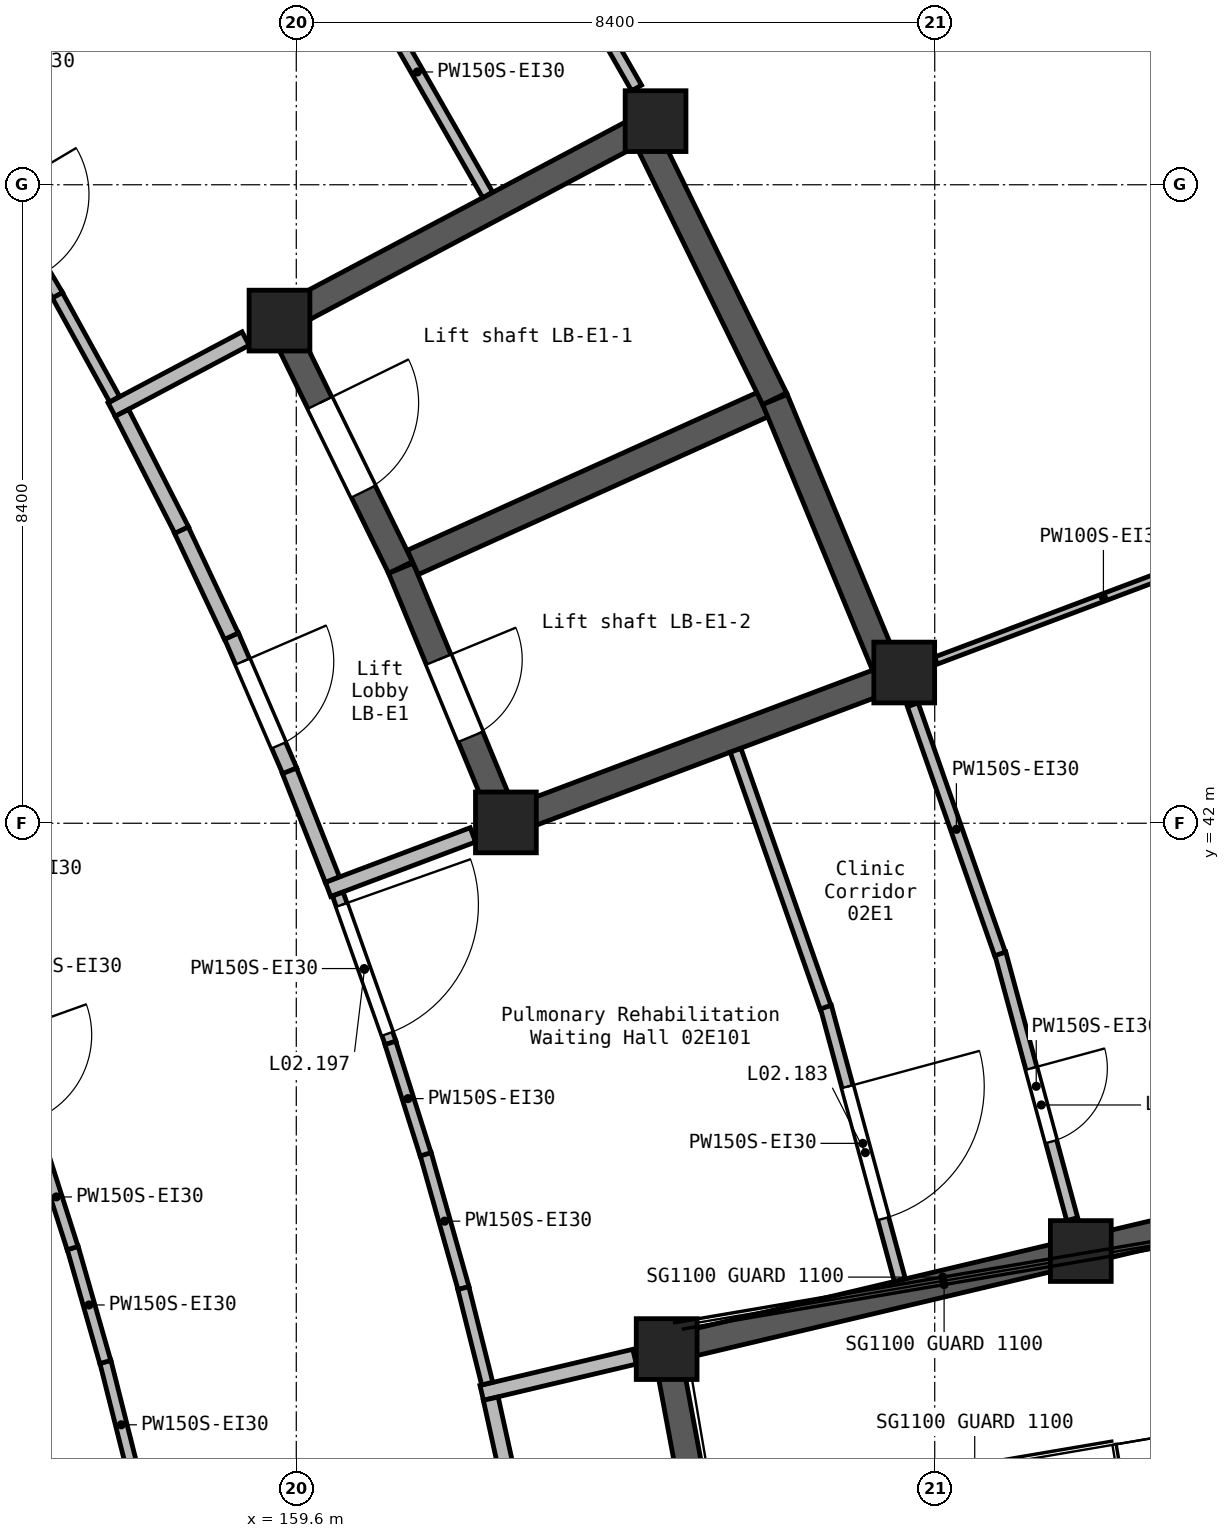
"""IFC4 building model, lengths in metres.
Left out: names, types, materials, properties, quantities, classifications, styles, units other than length and angle.
Written with IfcOpenShell. Run it as: python <this file> out.ifc"""

import sys

from ifc_helpers import new_model, si_unit, direction, frame, frame_2d, origin, origin_2d, place, context, subcontext, project, spatial, rectangle, extrude, element, fill, save


model = new_model("IFC4")
c1 = context("Model", 3, precision=1e-05, world=origin(), true_north=direction((0.0, 1.0)))
c2 = subcontext(c1, "Body", "Model", "MODEL_VIEW")
j1 = project(units=[si_unit("LENGTHUNIT", "METRE"), si_unit("PLANEANGLEUNIT", "RADIAN")], contexts=[c1])
p1 = place(None, origin())
s1 = spatial("IfcSite", under=j1, at=p1, CompositionType="ELEMENT")
p2 = place(p1, origin())
s2 = spatial("IfcBuilding", under=s1, at=p2, CompositionType="ELEMENT")
p3 = place(p2, frame((0.0, 0.0, 12.6)))
s3 = spatial("IfcBuildingStorey", under=s2, at=p3, CompositionType="ELEMENT", Elevation=12.6)
for number, where, z_axis, x_axis in (
    (1, (159.379, 48.613, 0.0), (0.0, 0.0, 1.0), (1.0, 0.0, 0.0)),
    (2, (162.358, 42.011, 0.0), (0.0, 0.0, 1.0), (1.0, 0.0, 0.0)),
    (3, (164.327, 51.237, 0.0), (0.0, 0.0, 1.0), (1.0, 0.0, 0.0)),
    (4, (164.473, 35.082, 0.0), (0.0, 0.0, 1.0), (1.0, 0.0, 0.0)),
    (5, (167.599, 43.983, 0.0), (0.0, 0.0, 1.0), (1.0, 0.0, 0.0)),
    (6, (169.922, 36.372, 0.0), (0.0, 0.0, 1.0), (1.0, 0.0, 0.0)),
):
    element("IfcColumn", number, at=place(p3, frame(where, z_axis=z_axis, x_axis=x_axis)), inside=s3, PredefinedType="COLUMN", context=c2, shape_type="SweptSolid", body=[
        extrude(rectangle(XDim=0.8, YDim=0.8, at=origin_2d()), origin(), (0.0, 0.0, 1.0), 4.2),
    ])
p4 = place(p3, frame((159.224, 48.531, 0.0), z_axis=(0.0, 0.0, 1.0), x_axis=(0.883393138637, 0.468632652094, 0.0)))
e7 = element("IfcWall", 7, at=p4, inside=s3, PredefinedType="SHEAR", context=c2, shape_type="SweptSolid", body=[
    extrude(rectangle(XDim=5.751, YDim=0.35, at=frame_2d((2.875, 0.0))), origin(), (0.0, 0.0, 1.0), 4.2),
])
p5 = place(p3, frame((159.456, 48.456, 0.0), z_axis=(0.0, 0.0, 1.0), x_axis=(0.440221126053, -0.89788939195, 0.0)))
e8 = element("IfcWall", 8, at=p5, inside=s3, PredefinedType="SHEAR", context=c2, shape_type="SweptSolid", body=[
    extrude(rectangle(XDim=3.442, YDim=0.35, at=frame_2d((1.721, 0.0))), origin(), (0.0, 0.0, 1.0), 4.2),
])
p6 = place(p5, frame((1.031, 0.0, 0.0)))
e9 = element("IfcOpeningElement", 9, at=p6, cuts=e8, PredefinedType="OPENING", context=c2, shape_type="SweptSolid", body=[
    extrude(rectangle(XDim=1.3, YDim=2.1, at=frame_2d((0.65, 1.05))), frame((0.0, 0.185, 0.0), z_axis=(0.0, -1.0, 0.0), x_axis=(1.0, 0.0, 0.0)), (0.0, 0.0, 1.0), 0.37),
])
p7 = place(p3, frame((160.976, 45.355, 0.0), z_axis=(0.0, 0.0, 1.0), x_axis=(0.381990591944, -0.924166212143, 0.0)))
e10 = element("IfcWall", 10, at=p7, inside=s3, PredefinedType="SHEAR", context=c2, shape_type="SweptSolid", body=[
    extrude(rectangle(XDim=3.443, YDim=0.35, at=frame_2d((1.721, 0.0))), origin(), (0.0, 0.0, 1.0), 4.2),
])
p8 = place(p7, frame((1.3, 0.0, 0.0)))
e11 = element("IfcOpeningElement", 11, at=p8, cuts=e10, PredefinedType="OPENING", context=c2, shape_type="SweptSolid", body=[
    extrude(rectangle(XDim=1.1, YDim=2.1, at=frame_2d((0.55, 1.05))), frame((0.0, 0.185, 0.0), z_axis=(0.0, -1.0, 0.0), x_axis=(1.0, 0.0, 0.0)), (0.0, 0.0, 1.0), 0.37),
])
p9 = place(p3, frame((161.134, 45.432, 0.0), z_axis=(0.0, 0.0, 1.0), x_axis=(0.911564728385, 0.411156595427, 0.0)))
e12 = element("IfcWall", 12, at=p9, inside=s3, PredefinedType="SHEAR", context=c2, shape_type="SweptSolid", body=[
    extrude(rectangle(XDim=5.05, YDim=0.35, at=frame_2d((2.525, 0.0))), origin(), (0.0, 0.0, 1.0), 4.2),
])
p10 = place(p3, frame((162.194, 41.949, 0.0), z_axis=(0.0, 0.0, 1.0), x_axis=(0.935920223106, 0.352212061095, 0.0)))
e13 = element("IfcWall", 13, at=p10, inside=s3, PredefinedType="SHEAR", context=c2, shape_type="SweptSolid", body=[
    extrude(rectangle(XDim=5.75, YDim=0.35, at=frame_2d((2.875, 0.0))), origin(), (0.0, 0.0, 1.0), 4.2),
])
p11 = place(p3, frame((164.303, 35.042, 0.0), z_axis=(0.0, 0.0, 1.0), x_axis=(0.973093454504, 0.230410782737, 0.0)))
e14 = element("IfcWall", 14, at=p11, inside=s3, PredefinedType="SHEAR", context=c2, shape_type="SweptSolid", body=[
    extrude(rectangle(XDim=7.55, YDim=0.35, at=frame_2d((3.775, 0.0))), origin(), (0.0, 0.0, 1.0), 4.2),
])
p12 = place(p3, frame((165.469, 29.746, 0.0), z_axis=(0.0, 0.0, 1.0), x_axis=(-0.183471964923, 0.98302494276, 0.0)))
e15 = element("IfcWall", 15, at=p12, inside=s3, PredefinedType="SHEAR", context=c2, shape_type="SweptSolid", body=[
    extrude(rectangle(XDim=5.253, YDim=0.35, at=frame_2d((2.627, 0.0))), origin(), (0.0, 0.0, 1.0), 4.2),
])
p13 = place(p3, frame((165.894, 47.585, 0.0), z_axis=(0.0, 0.0, 1.0), x_axis=(-0.43992897418, 0.898032570499, 0.0)))
e16 = element("IfcWall", 16, at=p13, inside=s3, PredefinedType="SHEAR", context=c2, shape_type="SweptSolid", body=[
    extrude(rectangle(XDim=3.788, YDim=0.35, at=frame_2d((1.894, 0.0))), origin(), (0.0, 0.0, 1.0), 4.2),
])
p14 = place(p3, frame((167.345, 44.075, 0.0), z_axis=(0.0, 0.0, 1.0), x_axis=(-0.382046231428, 0.924143212415, 0.0)))
e17 = element("IfcWall", 17, at=p14, inside=s3, PredefinedType="SHEAR", context=c2, shape_type="SweptSolid", body=[
    extrude(rectangle(XDim=3.788, YDim=0.35, at=frame_2d((1.894, 0.0))), origin(), (0.0, 0.0, 1.0), 4.2),
])
p15 = place(p3, frame((162.04, 34.506, 0.0), z_axis=(0.0, 0.0, 1.0), x_axis=(0.973117236519, 0.230310321066, 0.0)))
e18 = element("IfcWall", 18, at=p15, inside=s3, PredefinedType="SOLIDWALL", context=c2, shape_type="SweptSolid", body=[
    extrude(rectangle(XDim=2.066, YDim=0.2, at=frame_2d((1.033, 0.0))), origin(), (0.0, 0.0, 1.0), 3.85),
])
p16 = place(p3, frame((160.018, 41.13, 0.0), z_axis=(0.0, 0.0, 1.0), x_axis=(0.935835444075, 0.352437259115, 0.0)))
e19 = element("IfcWall", 19, at=p16, inside=s3, PredefinedType="SOLIDWALL", context=c2, shape_type="SweptSolid", body=[
    extrude(rectangle(XDim=2.036, YDim=0.2, at=frame_2d((1.018, 0.0))), origin(), (0.0, 0.0, 1.0), 3.85),
])
p17 = place(p3, frame((157.171, 47.442, 0.0), z_axis=(0.0, 0.0, 1.0), x_axis=(0.883475149074, 0.468478026133, 0.0)))
e20 = element("IfcWall", 20, at=p17, inside=s3, PredefinedType="SOLIDWALL", context=c2, shape_type="SweptSolid", body=[
    extrude(rectangle(XDim=1.995, YDim=0.2, at=frame_2d((0.998, 0.0))), origin(), (0.0, 0.0, 1.0), 3.85),
])
p18 = place(p3, frame((158.747, 44.465, 0.0), z_axis=(0.0, 0.0, 1.0), x_axis=(0.396322487651, -0.918111368943, 0.0)))
e21 = element("IfcWall", 21, at=p18, inside=s3, PredefinedType="SOLIDWALL", context=c2, shape_type="SweptSolid", body=[
    extrude(rectangle(XDim=1.936, YDim=0.2, at=frame_2d((0.968, 0.0))), origin(), (0.0, 0.0, 1.0), 3.85),
])
p19 = place(p18, frame((0.368, 0.0, 0.0)))
e22 = element("IfcOpeningElement", 22, at=p19, cuts=e21, PredefinedType="OPENING", context=c2, shape_type="SweptSolid", body=[
    extrude(rectangle(XDim=1.2, YDim=2.1, at=frame_2d((0.6, 1.05))), frame((0.0, 0.11, 0.0), z_axis=(0.0, -1.0, 0.0), x_axis=(1.0, 0.0, 0.0)), (0.0, 0.0, 1.0), 0.22),
])
p20 = place(p3, frame((157.305, 47.399, 0.0), z_axis=(0.0, 0.0, 1.0), x_axis=(0.454575201636, -0.890708361955, 0.0)))
e23 = element("IfcWall", 23, at=p20, inside=s3, PredefinedType="SOLIDWALL", context=c2, shape_type="SweptSolid", body=[
    extrude(rectangle(XDim=1.734, YDim=0.2, at=frame_2d((0.867, 0.0))), origin(), (0.0, 0.0, 1.0), 3.85),
])
p21 = place(p3, frame((162.159, 34.43, 0.0), z_axis=(0.0, 0.0, 1.0), x_axis=(0.215079958229, -0.976596442533, 0.0)))
e24 = element("IfcWall", 24, at=p21, inside=s3, PredefinedType="SOLIDWALL", context=c2, shape_type="SweptSolid", body=[
    extrude(rectangle(XDim=1.537, YDim=0.2, at=frame_2d((0.769, 0.0))), origin(), (0.0, 0.0, 1.0), 3.85),
])
p22 = place(p3, frame((158.089, 45.855, 0.0), z_axis=(0.0, 0.0, 1.0), x_axis=(0.42579703633, -0.904818702201, 0.0)))
e25 = element("IfcWall", 25, at=p22, inside=s3, PredefinedType="SOLIDWALL", context=c2, shape_type="SweptSolid", body=[
    extrude(rectangle(XDim=1.541, YDim=0.2, at=frame_2d((0.771, 0.0))), origin(), (0.0, 0.0, 1.0), 3.85),
])
p23 = place(p3, frame((159.51, 42.689, 0.0), z_axis=(0.0, 0.0, 1.0), x_axis=(0.367195475631, -0.930143796773, 0.0)))
e26 = element("IfcWall", 26, at=p23, inside=s3, PredefinedType="SOLIDWALL", context=c2, shape_type="SweptSolid", body=[
    extrude(rectangle(XDim=1.537, YDim=0.2, at=frame_2d((0.768, 0.0))), origin(), (0.0, 0.0, 1.0), 3.85),
])
p24 = place(p3, frame((162.313, 54.758, 0.0), z_axis=(0.0, 0.0, 1.0), x_axis=(0.496582798362, -0.867989357291, 0.0)))
e27 = element("IfcWall", 27, at=p24, inside=s3, PredefinedType="PARTITIONING", context=c2, shape_type="SweptSolid", body=[
    extrude(rectangle(XDim=3.553, YDim=0.15, at=frame_2d((1.777, 0.0))), origin(), (0.0, 0.0, 1.0), 3.85),
])
p25 = place(p24, frame((1.566, 0.0, 0.0)))
e28 = element("IfcOpeningElement", 28, at=p25, cuts=e27, PredefinedType="OPENING", context=c2, shape_type="SweptSolid", body=[
    extrude(rectangle(XDim=1.0, YDim=2.1, at=frame_2d((0.5, 1.05))), frame((0.0, 0.085, 0.0), z_axis=(0.0, -1.0, 0.0), x_axis=(1.0, 0.0, 0.0)), (0.0, 0.0, 1.0), 0.17),
])
p26 = place(p3, frame((168.862, 40.287, 0.0), z_axis=(0.0, 0.0, 1.0), x_axis=(0.261268938462, -0.965266047157, 0.0)))
e29 = element("IfcWall", 29, at=p26, inside=s3, PredefinedType="PARTITIONING", context=c2, shape_type="SweptSolid", body=[
    extrude(rectangle(XDim=3.622, YDim=0.15, at=frame_2d((1.811, 0.0))), origin(), (0.0, 0.0, 1.0), 3.85),
])
p27 = place(p26, frame((1.566, 0.0, 0.0)))
e30 = element("IfcOpeningElement", 30, at=p27, cuts=e29, PredefinedType="OPENING", context=c2, shape_type="SweptSolid", body=[
    extrude(rectangle(XDim=1.0, YDim=2.1, at=frame_2d((0.5, 1.05))), frame((0.0, 0.085, 0.0), z_axis=(0.0, -1.0, 0.0), x_axis=(1.0, 0.0, 0.0)), (0.0, 0.0, 1.0), 0.17),
])
p28 = place(p3, frame((167.711, 43.559, 0.0), z_axis=(0.0, 0.0, 1.0), x_axis=(0.330491338893, -0.9438090246, 0.0)))
e31 = element("IfcWall", 31, at=p28, inside=s3, PredefinedType="PARTITIONING", context=c2, shape_type="SweptSolid", body=[
    extrude(rectangle(XDim=3.473, YDim=0.15, at=frame_2d((1.736, 0.0))), origin(), (0.0, 0.0, 1.0), 3.85),
])
p29 = place(p3, frame((166.567, 39.586, 0.0), z_axis=(0.0, 0.0, 1.0), x_axis=(0.261225938755, -0.965277684877, 0.0)))
e32 = element("IfcWall", 32, at=p29, inside=s3, PredefinedType="PARTITIONING", context=c2, shape_type="SweptSolid", body=[
    extrude(rectangle(XDim=3.725, YDim=0.15, at=frame_2d((1.863, 0.0))), origin(), (0.0, 0.0, 1.0), 3.85),
])
p30 = place(p29, frame((1.089, 0.0, 0.0)))
e33 = element("IfcOpeningElement", 33, at=p30, cuts=e32, PredefinedType="OPENING", context=c2, shape_type="SweptSolid", body=[
    extrude(rectangle(XDim=1.8, YDim=2.1, at=frame_2d((0.9, 1.05))), frame((0.0, 0.085, 0.0), z_axis=(0.0, -1.0, 0.0), x_axis=(1.0, 0.0, 0.0)), (0.0, 0.0, 1.0), 0.17),
])
p31 = place(p3, frame((160.269, 53.501, 0.0), z_axis=(0.0, 0.0, 1.0), x_axis=(0.496371795626, -0.8681100394, 0.0)))
e34 = element("IfcWall", 34, at=p31, inside=s3, PredefinedType="PARTITIONING", context=c2, shape_type="SweptSolid", body=[
    extrude(rectangle(XDim=3.726, YDim=0.15, at=frame_2d((1.863, 0.0))), origin(), (0.0, 0.0, 1.0), 3.85),
])
p32 = place(p3, frame((165.38, 42.96, 0.0), z_axis=(0.0, 0.0, 1.0), x_axis=(0.330508329073, -0.943803075018, 0.0)))
e35 = element("IfcWall", 35, at=p32, inside=s3, PredefinedType="PARTITIONING", context=c2, shape_type="SweptSolid", body=[
    extrude(rectangle(XDim=3.581, YDim=0.15, at=frame_2d((1.791, 0.0))), origin(), (0.0, 0.0, 1.0), 3.85),
])
p33 = place(p3, frame((160.146, 41.068, 0.0), z_axis=(0.0, 0.0, 1.0), x_axis=(0.334170983673, -0.942512468708, 0.0)))
e36 = element("IfcWall", 36, at=p33, inside=s3, PredefinedType="PARTITIONING", context=c2, shape_type="SweptSolid", body=[
    extrude(rectangle(XDim=2.079, YDim=0.15, at=frame_2d((1.04, 0.0))), origin(), (0.0, 0.0, 1.0), 3.85),
])
p34 = place(p33, frame((0.151, 0.0, 0.0)))
e37 = element("IfcOpeningElement", 37, at=p34, cuts=e36, PredefinedType="OPENING", context=c2, shape_type="SweptSolid", body=[
    extrude(rectangle(XDim=1.8, YDim=2.1, at=frame_2d((0.9, 1.05))), frame((0.0, 0.085, 0.0), z_axis=(0.0, -1.0, 0.0), x_axis=(1.0, 0.0, 0.0)), (0.0, 0.0, 1.0), 0.17),
])
p35 = place(p3, frame((155.498, 50.566, 0.0), z_axis=(0.0, 0.0, 1.0), x_axis=(0.510320389621, -0.859984360287, 0.0)))
e38 = element("IfcWall", 38, at=p35, inside=s3, PredefinedType="PARTITIONING", context=c2, shape_type="SweptSolid", body=[
    extrude(rectangle(XDim=1.886, YDim=0.15, at=frame_2d((0.943, 0.0))), origin(), (0.0, 0.0, 1.0), 3.85),
])
p36 = place(p35, frame((0.343, 0.0, 0.0)))
e39 = element("IfcOpeningElement", 39, at=p36, cuts=e38, PredefinedType="OPENING", context=c2, shape_type="SweptSolid", body=[
    extrude(rectangle(XDim=1.2, YDim=2.1, at=frame_2d((0.6, 1.05))), frame((0.0, 0.085, 0.0), z_axis=(0.0, -1.0, 0.0), x_axis=(1.0, 0.0, 0.0)), (0.0, 0.0, 1.0), 0.17),
])
p37 = place(p3, frame((156.457, 48.945, 0.0), z_axis=(0.0, 0.0, 1.0), x_axis=(0.482411223267, -0.875944867937, 0.0)))
e40 = element("IfcWall", 40, at=p37, inside=s3, PredefinedType="PARTITIONING", context=c2, shape_type="SweptSolid", body=[
    extrude(rectangle(XDim=1.56, YDim=0.15, at=frame_2d((0.78, 0.0))), origin(), (0.0, 0.0, 1.0), 3.85),
])
p38 = place(p3, frame((161.302, 37.647, 0.0), z_axis=(0.0, 0.0, 1.0), x_axis=(0.271536076628, -0.962428261789, 0.0)))
e41 = element("IfcWall", 41, at=p38, inside=s3, PredefinedType="PARTITIONING", context=c2, shape_type="SweptSolid", body=[
    extrude(rectangle(XDim=1.833, YDim=0.15, at=frame_2d((0.917, 0.0))), origin(), (0.0, 0.0, 1.0), 3.85),
])
p39 = place(p3, frame((160.838, 39.11, 0.0), z_axis=(0.0, 0.0, 1.0), x_axis=(0.301321411033, -0.953522630698, 0.0)))
e42 = element("IfcWall", 42, at=p39, inside=s3, PredefinedType="PARTITIONING", context=c2, shape_type="SweptSolid", body=[
    extrude(rectangle(XDim=1.537, YDim=0.15, at=frame_2d((0.769, 0.0))), origin(), (0.0, 0.0, 1.0), 3.85),
])
p40 = place(p3, frame((157.089, 34.915, 0.0), z_axis=(0.0, 0.0, 1.0), x_axis=(0.243846269547, -0.969813898038, 0.0)))
e43 = element("IfcWall", 43, at=p40, inside=s3, PredefinedType="PARTITIONING", context=c2, shape_type="SweptSolid", body=[
    extrude(rectangle(XDim=1.709, YDim=0.15, at=frame_2d((0.854, 0.0))), origin(), (0.0, 0.0, 1.0), 3.85),
])
p41 = place(p3, frame((156.658, 36.413, 0.0), z_axis=(0.0, 0.0, 1.0), x_axis=(0.27445261009, -0.961600626463, 0.0)))
e44 = element("IfcWall", 44, at=p41, inside=s3, PredefinedType="PARTITIONING", context=c2, shape_type="SweptSolid", body=[
    extrude(rectangle(XDim=1.561, YDim=0.15, at=frame_2d((0.781, 0.0))), origin(), (0.0, 0.0, 1.0), 3.85),
])
p42 = place(p3, frame((156.227, 37.757, 0.0), z_axis=(0.0, 0.0, 1.0), x_axis=(0.304180257637, -0.95261449226, 0.0)))
e45 = element("IfcWall", 45, at=p42, inside=s3, PredefinedType="PARTITIONING", context=c2, shape_type="SweptSolid", body=[
    extrude(rectangle(XDim=1.413, YDim=0.15, at=frame_2d((0.707, 0.0))), origin(), (0.0, 0.0, 1.0), 3.85),
])
p43 = place(p3, frame((161.798, 35.884, 0.0), z_axis=(0.0, 0.0, 1.0), x_axis=(0.243023571224, -0.970020383203, 0.0)))
e46 = element("IfcWall", 46, at=p43, inside=s3, PredefinedType="PARTITIONING", context=c2, shape_type="SweptSolid", body=[
    extrude(rectangle(XDim=1.295, YDim=0.15, at=frame_2d((0.647, 0.0))), origin(), (0.0, 0.0, 1.0), 3.85),
])
p44 = place(p3, frame((168.016, 44.14, 0.0), z_axis=(0.0, 0.0, 1.0), x_axis=(0.935850976525, 0.352396012659, 0.0)))
e47 = element("IfcWall", 47, at=p44, inside=s3, PredefinedType="PARTITIONING", context=c2, shape_type="SweptSolid", body=[
    extrude(rectangle(XDim=4.708, YDim=0.1, at=frame_2d((2.354, 0.0))), origin(), (0.0, 0.0, 1.0), 3.85),
])
p45 = place(p30, origin())
e48 = element("IfcDoor", 48, at=p45, inside=s3, OperationType="DOUBLE_DOOR_SINGLE_SWING", PredefinedType="DOOR", context=c2, shape_type="SweptSolid", body=[
    extrude(rectangle(XDim=1.8, YDim=2.1, at=frame_2d((0.9, 1.05))), frame((0.0, 0.025, 0.0), z_axis=(0.0, -1.0, 0.0), x_axis=(1.0, 0.0, 0.0)), (0.0, 0.0, 1.0), 0.05),
])
fill(e33, e48)
p46 = place(p19, origin())
e49 = element("IfcDoor", 49, at=p46, inside=s3, OperationType="SINGLE_SWING_LEFT", PredefinedType="DOOR", context=c2, shape_type="SweptSolid", body=[
    extrude(rectangle(XDim=1.2, YDim=2.1, at=frame_2d((0.6, 1.05))), frame((0.0, 0.025, 0.0), z_axis=(0.0, -1.0, 0.0), x_axis=(1.0, 0.0, 0.0)), (0.0, 0.0, 1.0), 0.05),
])
fill(e22, e49)
p47 = place(p34, frame((1.8, 0.0, 0.0), z_axis=(0.0, 0.0, 1.0), x_axis=(-1.0, 0.0, 0.0)))
e50 = element("IfcDoor", 50, at=p47, inside=s3, OperationType="DOUBLE_DOOR_SINGLE_SWING", PredefinedType="DOOR", context=c2, shape_type="SweptSolid", body=[
    extrude(rectangle(XDim=1.8, YDim=2.1, at=frame_2d((0.9, 1.05))), frame((0.0, 0.025, 0.0), z_axis=(0.0, -1.0, 0.0), x_axis=(1.0, 0.0, 0.0)), (0.0, 0.0, 1.0), 0.05),
])
fill(e37, e50)
p48 = place(p27, origin())
e51 = element("IfcDoor", 51, at=p48, inside=s3, OperationType="SINGLE_SWING_RIGHT", PredefinedType="DOOR", context=c2, shape_type="SweptSolid", body=[
    extrude(rectangle(XDim=1.0, YDim=2.1, at=frame_2d((0.5, 1.05))), frame((0.0, 0.025, 0.0), z_axis=(0.0, -1.0, 0.0), x_axis=(1.0, 0.0, 0.0)), (0.0, 0.0, 1.0), 0.05),
])
fill(e30, e51)
p49 = place(p6, origin())
e52 = element("IfcDoor", 52, at=p49, inside=s3, OperationType="DOUBLE_DOOR_SLIDING", PredefinedType="DOOR", context=c2, shape_type="SweptSolid", body=[
    extrude(rectangle(XDim=1.3, YDim=2.1, at=frame_2d((0.65, 1.05))), frame((0.0, 0.025, 0.0), z_axis=(0.0, -1.0, 0.0), x_axis=(1.0, 0.0, 0.0)), (0.0, 0.0, 1.0), 0.05),
])
fill(e9, e52)
p50 = place(p8, origin())
e53 = element("IfcDoor", 53, at=p50, inside=s3, OperationType="DOUBLE_DOOR_SLIDING", PredefinedType="DOOR", context=c2, shape_type="SweptSolid", body=[
    extrude(rectangle(XDim=1.1, YDim=2.1, at=frame_2d((0.55, 1.05))), frame((0.0, 0.025, 0.0), z_axis=(0.0, -1.0, 0.0), x_axis=(1.0, 0.0, 0.0)), (0.0, 0.0, 1.0), 0.05),
])
fill(e11, e53)
save(model, sys.argv[1])
